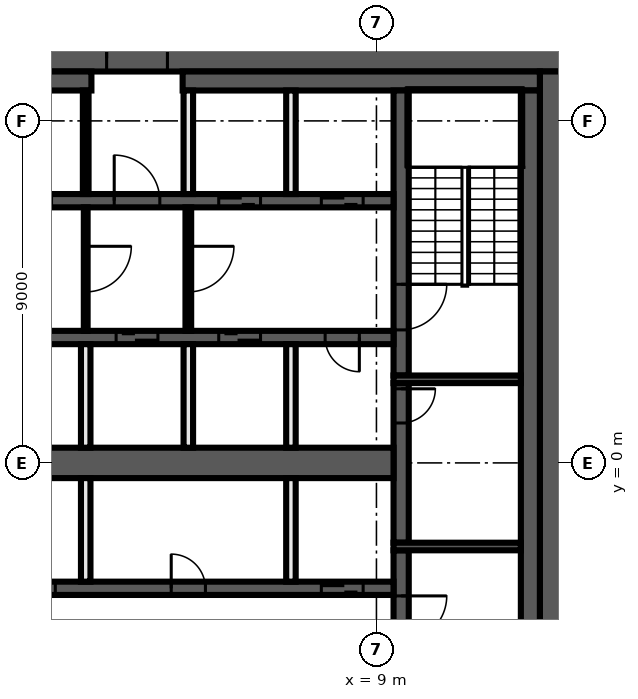
"""IFC4 building model, lengths in metres.
Left out: names, types, materials, properties, quantities, classifications, styles, units other than length and angle.
Written with IfcOpenShell. Run it as: python <this file> out.ifc"""

import sys

from ifc_helpers import new_model, si_unit, direction, frame, frame_2d, origin, place, context, subcontext, project, spatial, rectangle, extrude, element, fill, save


model = new_model("IFC4")
c1 = context("Model", 3, precision=1e-05, world=origin(), true_north=direction((0.0, 1.0)))
c2 = subcontext(c1, "Body", "Model", "MODEL_VIEW")
j1 = project(units=[si_unit("LENGTHUNIT", "METRE"), si_unit("PLANEANGLEUNIT", "RADIAN")], contexts=[c1])
p1 = place(None, origin())
s1 = spatial("IfcSite", under=j1, at=p1, CompositionType="ELEMENT")
p2 = place(p1, origin())
s2 = spatial("IfcBuilding", under=s1, at=p2, CompositionType="ELEMENT")
p3 = place(p2, frame((0.0, 0.0, 241.2)))
s3 = spatial("IfcBuildingStorey", under=s2, at=p3, CompositionType="ELEMENT", Elevation=241.2)
p4 = place(p3, frame((-14.0, 10.65, 0.0), z_axis=(0.0, 0.0, 1.0), x_axis=(1.0, 0.0, 0.0)))
e1 = element("IfcWall", 1, at=p4, inside=s3, PredefinedType="SHEAR", context=c2, shape_type="SweptSolid", body=[
    extrude(rectangle(XDim=28.0, YDim=0.7, at=frame_2d((14.0, 0.0))), origin(), (0.0, 0.0, 1.0), 3.82),
])
p5 = place(p4, frame((15.9, 0.0, 0.0)))
e2 = element("IfcOpeningElement", 2, at=p5, cuts=e1, PredefinedType="OPENING", context=c2, shape_type="SweptSolid", body=[
    extrude(rectangle(XDim=1.6, YDim=2.1, at=frame_2d((0.8, 1.05))), frame((0.0, 0.36, 0.0), z_axis=(0.0, -1.0, 0.0), x_axis=(1.0, 0.0, 0.0)), (0.0, 0.0, 1.0), 0.72),
])
p6 = place(p3, frame((13.65, 10.3, 0.0), z_axis=(0.0, 0.0, 1.0), x_axis=(0.0, -1.0, 0.0)))
e3 = element("IfcWall", 3, at=p6, inside=s3, PredefinedType="SHEAR", context=c2, shape_type="SweptSolid", body=[
    extrude(rectangle(XDim=20.6, YDim=0.7, at=frame_2d((10.3, 0.0))), origin(), (0.0, 0.0, 1.0), 3.82),
])
p7 = place(p3, frame((-13.3, 10.05, 0.0), z_axis=(0.0, 0.0, 1.0), x_axis=(1.0, 0.0, 0.0)))
e4 = element("IfcWall", 4, at=p7, inside=s3, PredefinedType="SHEAR", context=c2, shape_type="SweptSolid", body=[
    extrude(rectangle(XDim=14.8, YDim=0.5, at=frame_2d((7.4, 0.0))), origin(), (0.0, 0.0, 1.0), 3.82),
])
p8 = place(p3, frame((3.9, 10.05, 0.0), z_axis=(0.0, 0.0, 1.0), x_axis=(1.0, 0.0, 0.0)))
e5 = element("IfcWall", 5, at=p8, inside=s3, PredefinedType="SHEAR", context=c2, shape_type="SweptSolid", body=[
    extrude(rectangle(XDim=9.4, YDim=0.5, at=frame_2d((4.7, 0.0))), origin(), (0.0, 0.0, 1.0), 3.82),
])
p9 = place(p3, frame((13.05, 9.8, 0.0), z_axis=(0.0, 0.0, 1.0), x_axis=(0.0, -1.0, 0.0)))
e6 = element("IfcWall", 6, at=p9, inside=s3, PredefinedType="SHEAR", context=c2, shape_type="SweptSolid", body=[
    extrude(rectangle(XDim=19.6, YDim=0.5, at=frame_2d((9.8, 0.0))), origin(), (0.0, 0.0, 1.0), 3.82),
])
p10 = place(p3, frame((9.65, -2.3, 0.0), z_axis=(0.0, 0.0, 1.0), x_axis=(0.0, -1.0, 0.0)))
e7 = element("IfcWall", 7, at=p10, inside=s3, PredefinedType="SHEAR", context=c2, shape_type="SweptSolid", body=[
    extrude(rectangle(XDim=7.5, YDim=0.4, at=frame_2d((3.75, 0.0))), origin(), (0.0, 0.0, 1.0), 3.82),
])
p11 = place(p10, frame((1.2, 0.0, 0.0)))
e8 = element("IfcOpeningElement", 8, at=p11, cuts=e7, PredefinedType="OPENING", context=c2, shape_type="SweptSolid", body=[
    extrude(rectangle(XDim=1.2, YDim=2.1, at=frame_2d((0.6, 1.05))), frame((0.0, 0.21, 0.0), z_axis=(0.0, -1.0, 0.0), x_axis=(1.0, 0.0, 0.0)), (0.0, 0.0, 1.0), 0.42),
])
p12 = place(p3, frame((9.65, 2.1, 0.0), z_axis=(0.0, 0.0, 1.0), x_axis=(0.0, -1.0, 0.0)))
e9 = element("IfcWall", 9, at=p12, inside=s3, PredefinedType="SHEAR", context=c2, shape_type="SweptSolid", body=[
    extrude(rectangle(XDim=4.2, YDim=0.4, at=frame_2d((2.1, 0.0))), origin(), (0.0, 0.0, 1.0), 3.82),
])
p13 = place(p12, frame((0.15, 0.0, 0.0)))
e10 = element("IfcOpeningElement", 10, at=p13, cuts=e9, PredefinedType="OPENING", context=c2, shape_type="SweptSolid", body=[
    extrude(rectangle(XDim=0.9, YDim=2.1, at=frame_2d((0.45, 1.05))), frame((0.0, 0.21, 0.0), z_axis=(0.0, -1.0, 0.0), x_axis=(1.0, 0.0, 0.0)), (0.0, 0.0, 1.0), 0.42),
])
p14 = place(p3, frame((9.65, 9.8, 0.0), z_axis=(0.0, 0.0, 1.0), x_axis=(0.0, -1.0, 0.0)))
e11 = element("IfcWall", 11, at=p14, inside=s3, PredefinedType="SHEAR", context=c2, shape_type="SweptSolid", body=[
    extrude(rectangle(XDim=7.5, YDim=0.4, at=frame_2d((3.75, 0.0))), origin(), (0.0, 0.0, 1.0), 3.82),
])
p15 = place(p14, frame((5.1, 0.0, 0.0)))
e12 = element("IfcOpeningElement", 12, at=p15, cuts=e11, PredefinedType="OPENING", context=c2, shape_type="SweptSolid", body=[
    extrude(rectangle(XDim=1.2, YDim=2.1, at=frame_2d((0.6, 1.05))), frame((0.0, 0.21, 0.0), z_axis=(0.0, -1.0, 0.0), x_axis=(1.0, 0.0, 0.0)), (0.0, 0.0, 1.0), 0.42),
])
for number, where, z_axis, x_axis in (
    (13, (9.45, 2.2, 0.0), (0.0, 0.0, 1.0), (1.0, 0.0, 0.0)),
    (14, (9.45, -2.2, 0.0), (0.0, 0.0, 1.0), (1.0, 0.0, 0.0)),
):
    element("IfcWall", number, at=place(p3, frame(where, z_axis=z_axis, x_axis=x_axis)), inside=s3, PredefinedType="SHEAR", context=c2, shape_type="SweptSolid", body=[
        extrude(rectangle(XDim=3.35, YDim=0.2, at=frame_2d((1.675, 0.0))), origin(), (0.0, 0.0, 1.0), 3.82),
    ])
p16 = place(p3, frame((-9.45, 6.9, 0.0), z_axis=(0.0, 0.0, 1.0), x_axis=(1.0, 0.0, 0.0)))
e15 = element("IfcWall", 15, at=p16, inside=s3, PredefinedType="SHEAR", context=c2, shape_type="SweptSolid", body=[
    extrude(rectangle(XDim=18.9, YDim=0.35, at=frame_2d((9.45, 0.0))), origin(), (0.0, 0.0, 1.0), 3.82),
])
p17 = place(p16, frame((11.55, 0.0, 0.0)))
e16 = element("IfcOpeningElement", 16, at=p17, cuts=e15, PredefinedType="OPENING", context=c2, shape_type="SweptSolid", body=[
    extrude(rectangle(XDim=1.2, YDim=2.1, at=frame_2d((0.6, 1.05))), frame((0.0, 0.185, 0.0), z_axis=(0.0, -1.0, 0.0), x_axis=(1.0, 0.0, 0.0)), (0.0, 0.0, 1.0), 0.37),
])
p18 = place(p16, frame((14.3, 0.0, 0.0)))
e17 = element("IfcOpeningElement", 17, at=p18, cuts=e15, PredefinedType="OPENING", context=c2, shape_type="SweptSolid", body=[
    extrude(rectangle(XDim=1.1, YDim=2.1, at=frame_2d((0.55, 1.05))), frame((0.0, 0.185, 0.0), z_axis=(0.0, -1.0, 0.0), x_axis=(1.0, 0.0, 0.0)), (0.0, 0.0, 1.0), 0.37),
])
p19 = place(p16, frame((17.0, 0.0, 0.0)))
e18 = element("IfcOpeningElement", 18, at=p19, cuts=e15, PredefinedType="OPENING", context=c2, shape_type="SweptSolid", body=[
    extrude(rectangle(XDim=1.1, YDim=2.1, at=frame_2d((0.55, 1.05))), frame((0.0, 0.185, 0.0), z_axis=(0.0, -1.0, 0.0), x_axis=(1.0, 0.0, 0.0)), (0.0, 0.0, 1.0), 0.37),
])
p20 = place(p16, frame((0.9, 0.0, 0.0)))
e19 = element("IfcOpeningElement", 19, at=p20, cuts=e15, PredefinedType="OPENING", context=c2, shape_type="SweptSolid", body=[
    extrude(rectangle(XDim=0.9, YDim=2.1, at=frame_2d((0.45, 1.05))), frame((0.0, 0.185, 0.0), z_axis=(0.0, -1.0, 0.0), x_axis=(1.0, 0.0, 0.0)), (0.0, 0.0, 1.0), 0.37),
])
p21 = place(p16, frame((3.6, 0.0, 0.0)))
e20 = element("IfcOpeningElement", 20, at=p21, cuts=e15, PredefinedType="OPENING", context=c2, shape_type="SweptSolid", body=[
    extrude(rectangle(XDim=0.9, YDim=2.1, at=frame_2d((0.45, 1.05))), frame((0.0, 0.185, 0.0), z_axis=(0.0, -1.0, 0.0), x_axis=(1.0, 0.0, 0.0)), (0.0, 0.0, 1.0), 0.37),
])
p22 = place(p16, frame((6.3, 0.0, 0.0)))
e21 = element("IfcOpeningElement", 21, at=p22, cuts=e15, PredefinedType="OPENING", context=c2, shape_type="SweptSolid", body=[
    extrude(rectangle(XDim=0.9, YDim=2.1, at=frame_2d((0.45, 1.05))), frame((0.0, 0.185, 0.0), z_axis=(0.0, -1.0, 0.0), x_axis=(1.0, 0.0, 0.0)), (0.0, 0.0, 1.0), 0.37),
])
p23 = place(p16, frame((9.0, 0.0, 0.0)))
e22 = element("IfcOpeningElement", 22, at=p23, cuts=e15, PredefinedType="OPENING", context=c2, shape_type="SweptSolid", body=[
    extrude(rectangle(XDim=0.9, YDim=2.1, at=frame_2d((0.45, 1.05))), frame((0.0, 0.185, 0.0), z_axis=(0.0, -1.0, 0.0), x_axis=(1.0, 0.0, 0.0)), (0.0, 0.0, 1.0), 0.37),
])
p24 = place(p3, frame((9.45, 3.3, 0.0), z_axis=(0.0, 0.0, 1.0), x_axis=(-1.0, 0.0, 0.0)))
e23 = element("IfcWall", 23, at=p24, inside=s3, PredefinedType="SHEAR", context=c2, shape_type="SweptSolid", body=[
    extrude(rectangle(XDim=18.9, YDim=0.35, at=frame_2d((9.45, 0.0))), origin(), (0.0, 0.0, 1.0), 3.82),
])
p25 = place(p24, frame((6.2, 0.0, 0.0)))
e24 = element("IfcOpeningElement", 24, at=p25, cuts=e23, PredefinedType="OPENING", context=c2, shape_type="SweptSolid", body=[
    extrude(rectangle(XDim=1.1, YDim=2.1, at=frame_2d((0.55, 1.05))), frame((0.0, 0.185, 0.0), z_axis=(0.0, -1.0, 0.0), x_axis=(1.0, 0.0, 0.0)), (0.0, 0.0, 1.0), 0.37),
])
p26 = place(p24, frame((3.5, 0.0, 0.0)))
e25 = element("IfcOpeningElement", 25, at=p26, cuts=e23, PredefinedType="OPENING", context=c2, shape_type="SweptSolid", body=[
    extrude(rectangle(XDim=1.1, YDim=2.1, at=frame_2d((0.55, 1.05))), frame((0.0, 0.185, 0.0), z_axis=(0.0, -1.0, 0.0), x_axis=(1.0, 0.0, 0.0)), (0.0, 0.0, 1.0), 0.37),
])
p27 = place(p24, frame((0.9, 0.0, 0.0)))
e26 = element("IfcOpeningElement", 26, at=p27, cuts=e23, PredefinedType="OPENING", context=c2, shape_type="SweptSolid", body=[
    extrude(rectangle(XDim=0.9, YDim=2.1, at=frame_2d((0.45, 1.05))), frame((0.0, 0.185, 0.0), z_axis=(0.0, -1.0, 0.0), x_axis=(1.0, 0.0, 0.0)), (0.0, 0.0, 1.0), 0.37),
])
p28 = place(p24, frame((15.75, 0.0, 0.0)))
e27 = element("IfcOpeningElement", 27, at=p28, cuts=e23, PredefinedType="OPENING", context=c2, shape_type="SweptSolid", body=[
    extrude(rectangle(XDim=0.9, YDim=2.1, at=frame_2d((0.45, 1.05))), frame((0.0, 0.185, 0.0), z_axis=(0.0, -1.0, 0.0), x_axis=(1.0, 0.0, 0.0)), (0.0, 0.0, 1.0), 0.37),
])
p29 = place(p24, frame((10.35, 0.0, 0.0)))
e28 = element("IfcOpeningElement", 28, at=p29, cuts=e23, PredefinedType="OPENING", context=c2, shape_type="SweptSolid", body=[
    extrude(rectangle(XDim=0.9, YDim=2.1, at=frame_2d((0.45, 1.05))), frame((0.0, 0.185, 0.0), z_axis=(0.0, -1.0, 0.0), x_axis=(1.0, 0.0, 0.0)), (0.0, 0.0, 1.0), 0.37),
])
p30 = place(p3, frame((-9.45, -3.3, 0.0), z_axis=(0.0, 0.0, 1.0), x_axis=(1.0, 0.0, 0.0)))
e29 = element("IfcWall", 29, at=p30, inside=s3, PredefinedType="SHEAR", context=c2, shape_type="SweptSolid", body=[
    extrude(rectangle(XDim=18.9, YDim=0.35, at=frame_2d((9.45, 0.0))), origin(), (0.0, 0.0, 1.0), 3.82),
])
p31 = place(p30, frame((0.8, 0.0, 0.0)))
e30 = element("IfcOpeningElement", 30, at=p31, cuts=e29, PredefinedType="OPENING", context=c2, shape_type="SweptSolid", body=[
    extrude(rectangle(XDim=1.1, YDim=2.1, at=frame_2d((0.55, 1.05))), frame((0.0, 0.185, 0.0), z_axis=(0.0, -1.0, 0.0), x_axis=(1.0, 0.0, 0.0)), (0.0, 0.0, 1.0), 0.37),
])
p32 = place(p30, frame((3.5, 0.0, 0.0)))
e31 = element("IfcOpeningElement", 31, at=p32, cuts=e29, PredefinedType="OPENING", context=c2, shape_type="SweptSolid", body=[
    extrude(rectangle(XDim=1.1, YDim=2.1, at=frame_2d((0.55, 1.05))), frame((0.0, 0.185, 0.0), z_axis=(0.0, -1.0, 0.0), x_axis=(1.0, 0.0, 0.0)), (0.0, 0.0, 1.0), 0.37),
])
p33 = place(p30, frame((6.2, 0.0, 0.0)))
e32 = element("IfcOpeningElement", 32, at=p33, cuts=e29, PredefinedType="OPENING", context=c2, shape_type="SweptSolid", body=[
    extrude(rectangle(XDim=1.1, YDim=2.1, at=frame_2d((0.55, 1.05))), frame((0.0, 0.185, 0.0), z_axis=(0.0, -1.0, 0.0), x_axis=(1.0, 0.0, 0.0)), (0.0, 0.0, 1.0), 0.37),
])
p34 = place(p30, frame((8.9, 0.0, 0.0)))
e33 = element("IfcOpeningElement", 33, at=p34, cuts=e29, PredefinedType="OPENING", context=c2, shape_type="SweptSolid", body=[
    extrude(rectangle(XDim=1.1, YDim=2.1, at=frame_2d((0.55, 1.05))), frame((0.0, 0.185, 0.0), z_axis=(0.0, -1.0, 0.0), x_axis=(1.0, 0.0, 0.0)), (0.0, 0.0, 1.0), 0.37),
])
p35 = place(p30, frame((17.0, 0.0, 0.0)))
e34 = element("IfcOpeningElement", 34, at=p35, cuts=e29, PredefinedType="OPENING", context=c2, shape_type="SweptSolid", body=[
    extrude(rectangle(XDim=1.1, YDim=2.1, at=frame_2d((0.55, 1.05))), frame((0.0, 0.185, 0.0), z_axis=(0.0, -1.0, 0.0), x_axis=(1.0, 0.0, 0.0)), (0.0, 0.0, 1.0), 0.37),
])
p36 = place(p30, frame((13.05, 0.0, 0.0)))
e35 = element("IfcOpeningElement", 35, at=p36, cuts=e29, PredefinedType="OPENING", context=c2, shape_type="SweptSolid", body=[
    extrude(rectangle(XDim=0.9, YDim=2.1, at=frame_2d((0.45, 1.05))), frame((0.0, 0.185, 0.0), z_axis=(0.0, -1.0, 0.0), x_axis=(1.0, 0.0, 0.0)), (0.0, 0.0, 1.0), 0.37),
])
p37 = place(p3, frame((-9.45, 0.0, 0.0), z_axis=(0.0, 0.0, 1.0), x_axis=(1.0, 0.0, 0.0)))
e36 = element("IfcWall", 36, at=p37, inside=s3, PredefinedType="SHEAR", context=c2, shape_type="SweptSolid", body=[
    extrude(rectangle(XDim=18.9, YDim=0.8, at=frame_2d((9.45, 0.0))), origin(), (0.0, 0.0, 1.0), 3.82),
])
for number, where, z_axis, x_axis in (
    (37, (6.75, -3.125, 0.0), (0.0, 0.0, 1.0), (0.0, 1.0, 0.0)),
    (38, (6.75, 0.4, 0.0), (0.0, 0.0, 1.0), (0.0, 1.0, 0.0)),
    (39, (6.75, 7.075, 0.0), (0.0, 0.0, 1.0), (0.0, 1.0, 0.0)),
):
    element("IfcWall", number, at=place(p3, frame(where, z_axis=z_axis, x_axis=x_axis)), inside=s3, PredefinedType="SOLIDWALL", context=c2, shape_type="SweptSolid", body=[
        extrude(rectangle(XDim=2.725, YDim=0.25, at=frame_2d((1.363, 0.0))), origin(), (0.0, 0.0, 1.0), 3.82),
    ])
p38 = place(p3, frame((4.05, 6.725, 0.0), z_axis=(0.0, 0.0, 1.0), x_axis=(0.0, -1.0, 0.0)))
e40 = element("IfcWall", 40, at=p38, inside=s3, PredefinedType="PARTITIONING", context=c2, shape_type="SweptSolid", body=[
    extrude(rectangle(XDim=3.25, YDim=0.15, at=frame_2d((1.625, 0.0))), origin(), (0.0, 0.0, 1.0), 3.82),
])
p39 = place(p38, frame((1.025, 0.0, 0.0)))
e41 = element("IfcOpeningElement", 41, at=p39, cuts=e40, PredefinedType="OPENING", context=c2, shape_type="SweptSolid", body=[
    extrude(rectangle(XDim=1.2, YDim=2.1, at=frame_2d((0.6, 1.05))), frame((0.0, 0.085, 0.0), z_axis=(0.0, -1.0, 0.0), x_axis=(1.0, 0.0, 0.0)), (0.0, 0.0, 1.0), 0.17),
])
for number, where, z_axis, x_axis in (
    (42, (4.05, 0.4, 0.0), (0.0, 0.0, 1.0), (0.0, 1.0, 0.0)),
    (43, (4.05, 7.075, 0.0), (0.0, 0.0, 1.0), (0.0, 1.0, 0.0)),
):
    element("IfcWall", number, at=place(p3, frame(where, z_axis=z_axis, x_axis=x_axis)), inside=s3, PredefinedType="SOLIDWALL", context=c2, shape_type="SweptSolid", body=[
        extrude(rectangle(XDim=2.725, YDim=0.25, at=frame_2d((1.363, 0.0))), origin(), (0.0, 0.0, 1.0), 3.82),
    ])
p40 = place(p3, frame((1.35, 7.075, 0.0), z_axis=(0.0, 0.0, 1.0), x_axis=(0.0, 1.0, 0.0)))
e44 = element("IfcWall", 44, at=p40, inside=s3, PredefinedType="PARTITIONING", context=c2, shape_type="SweptSolid", body=[
    extrude(rectangle(XDim=2.725, YDim=0.15, at=frame_2d((1.363, 0.0))), origin(), (0.0, 0.0, 1.0), 3.82),
])
p41 = place(p3, frame((1.35, 6.725, 0.0), z_axis=(0.0, 0.0, 1.0), x_axis=(0.0, -1.0, 0.0)))
e45 = element("IfcWall", 45, at=p41, inside=s3, PredefinedType="PARTITIONING", context=c2, shape_type="SweptSolid", body=[
    extrude(rectangle(XDim=3.25, YDim=0.1, at=frame_2d((1.625, 0.0))), origin(), (0.0, 0.0, 1.0), 3.82),
])
p42 = place(p41, frame((1.025, 0.0, 0.0)))
e46 = element("IfcOpeningElement", 46, at=p42, cuts=e45, PredefinedType="OPENING", context=c2, shape_type="SweptSolid", body=[
    extrude(rectangle(XDim=1.2, YDim=2.1, at=frame_2d((0.6, 1.05))), frame((0.0, 0.06, 0.0), z_axis=(0.0, -1.0, 0.0), x_axis=(1.0, 0.0, 0.0)), (0.0, 0.0, 1.0), 0.12),
])
for number, where, z_axis, x_axis in (
    (47, (1.35, -3.125, 0.0), (0.0, 0.0, 1.0), (0.0, 1.0, 0.0)),
    (48, (1.35, 0.4, 0.0), (0.0, 0.0, 1.0), (0.0, 1.0, 0.0)),
):
    element("IfcWall", number, at=place(p3, frame(where, z_axis=z_axis, x_axis=x_axis)), inside=s3, PredefinedType="SOLIDWALL", context=c2, shape_type="SweptSolid", body=[
        extrude(rectangle(XDim=2.725, YDim=0.25, at=frame_2d((1.363, 0.0))), origin(), (0.0, 0.0, 1.0), 3.82),
    ])
p43 = place(p13, origin())
e49 = element("IfcDoor", 49, at=p43, inside=s3, OperationType="SINGLE_SWING_RIGHT", PredefinedType="DOOR", context=c2, shape_type="SweptSolid", body=[
    extrude(rectangle(XDim=0.9, YDim=2.1, at=frame_2d((0.45, 1.05))), frame((0.0, 0.025, 0.0), z_axis=(0.0, -1.0, 0.0), x_axis=(1.0, 0.0, 0.0)), (0.0, 0.0, 1.0), 0.05),
])
fill(e10, e49)
p44 = place(p5, origin())
e50 = element("IfcDoor", 50, at=p44, inside=s3, OperationType="DOUBLE_DOOR_SINGLE_SWING", PredefinedType="DOOR", context=c2, shape_type="SweptSolid", body=[
    extrude(rectangle(XDim=1.6, YDim=2.1, at=frame_2d((0.8, 1.05))), frame((0.0, 0.025, 0.0), z_axis=(0.0, -1.0, 0.0), x_axis=(1.0, 0.0, 0.0)), (0.0, 0.0, 1.0), 0.05),
])
fill(e2, e50)
p45 = place(p17, origin())
e51 = element("IfcDoor", 51, at=p45, inside=s3, OperationType="SINGLE_SWING_LEFT", PredefinedType="DOOR", context=c2, shape_type="SweptSolid", body=[
    extrude(rectangle(XDim=1.2, YDim=2.1, at=frame_2d((0.6, 1.05))), frame((0.0, 0.025, 0.0), z_axis=(0.0, -1.0, 0.0), x_axis=(1.0, 0.0, 0.0)), (0.0, 0.0, 1.0), 0.05),
])
fill(e16, e51)
p46 = place(p18, origin())
e52 = element("IfcDoor", 52, at=p46, inside=s3, OperationType="DOUBLE_DOOR_SLIDING", PredefinedType="DOOR", context=c2, shape_type="SweptSolid", body=[
    extrude(rectangle(XDim=1.1, YDim=2.1, at=frame_2d((0.55, 1.05))), frame((0.0, 0.025, 0.0), z_axis=(0.0, -1.0, 0.0), x_axis=(1.0, 0.0, 0.0)), (0.0, 0.0, 1.0), 0.05),
])
fill(e17, e52)
p47 = place(p19, origin())
e53 = element("IfcDoor", 53, at=p47, inside=s3, OperationType="DOUBLE_DOOR_SLIDING", PredefinedType="DOOR", context=c2, shape_type="SweptSolid", body=[
    extrude(rectangle(XDim=1.1, YDim=2.1, at=frame_2d((0.55, 1.05))), frame((0.0, 0.025, 0.0), z_axis=(0.0, -1.0, 0.0), x_axis=(1.0, 0.0, 0.0)), (0.0, 0.0, 1.0), 0.05),
])
fill(e18, e53)
p48 = place(p25, origin())
e54 = element("IfcDoor", 54, at=p48, inside=s3, OperationType="DOUBLE_DOOR_SLIDING", PredefinedType="DOOR", context=c2, shape_type="SweptSolid", body=[
    extrude(rectangle(XDim=1.1, YDim=2.1, at=frame_2d((0.55, 1.05))), frame((0.0, 0.025, 0.0), z_axis=(0.0, -1.0, 0.0), x_axis=(1.0, 0.0, 0.0)), (0.0, 0.0, 1.0), 0.05),
])
fill(e24, e54)
p49 = place(p26, origin())
e55 = element("IfcDoor", 55, at=p49, inside=s3, OperationType="DOUBLE_DOOR_SLIDING", PredefinedType="DOOR", context=c2, shape_type="SweptSolid", body=[
    extrude(rectangle(XDim=1.1, YDim=2.1, at=frame_2d((0.55, 1.05))), frame((0.0, 0.025, 0.0), z_axis=(0.0, -1.0, 0.0), x_axis=(1.0, 0.0, 0.0)), (0.0, 0.0, 1.0), 0.05),
])
fill(e25, e55)
p50 = place(p27, origin())
e56 = element("IfcDoor", 56, at=p50, inside=s3, OperationType="SINGLE_SWING_LEFT", PredefinedType="DOOR", context=c2, shape_type="SweptSolid", body=[
    extrude(rectangle(XDim=0.9, YDim=2.1, at=frame_2d((0.45, 1.05))), frame((0.0, 0.025, 0.0), z_axis=(0.0, -1.0, 0.0), x_axis=(1.0, 0.0, 0.0)), (0.0, 0.0, 1.0), 0.05),
])
fill(e26, e56)
p51 = place(p34, origin())
e57 = element("IfcDoor", 57, at=p51, inside=s3, OperationType="DOUBLE_DOOR_SLIDING", PredefinedType="DOOR", context=c2, shape_type="SweptSolid", body=[
    extrude(rectangle(XDim=1.1, YDim=2.1, at=frame_2d((0.55, 1.05))), frame((0.0, 0.025, 0.0), z_axis=(0.0, -1.0, 0.0), x_axis=(1.0, 0.0, 0.0)), (0.0, 0.0, 1.0), 0.05),
])
fill(e33, e57)
p52 = place(p35, origin())
e58 = element("IfcDoor", 58, at=p52, inside=s3, OperationType="DOUBLE_DOOR_SLIDING", PredefinedType="DOOR", context=c2, shape_type="SweptSolid", body=[
    extrude(rectangle(XDim=1.1, YDim=2.1, at=frame_2d((0.55, 1.05))), frame((0.0, 0.025, 0.0), z_axis=(0.0, -1.0, 0.0), x_axis=(1.0, 0.0, 0.0)), (0.0, 0.0, 1.0), 0.05),
])
fill(e34, e58)
p53 = place(p36, origin())
e59 = element("IfcDoor", 59, at=p53, inside=s3, OperationType="SINGLE_SWING_RIGHT", PredefinedType="DOOR", context=c2, shape_type="SweptSolid", body=[
    extrude(rectangle(XDim=0.9, YDim=2.1, at=frame_2d((0.45, 1.05))), frame((0.0, 0.025, 0.0), z_axis=(0.0, -1.0, 0.0), x_axis=(1.0, 0.0, 0.0)), (0.0, 0.0, 1.0), 0.05),
])
fill(e35, e59)
p54 = place(p15, origin())
e60 = element("IfcDoor", 60, at=p54, inside=s3, OperationType="SINGLE_SWING_LEFT", PredefinedType="DOOR", context=c2, shape_type="SweptSolid", body=[
    extrude(rectangle(XDim=1.2, YDim=2.1, at=frame_2d((0.6, 1.05))), frame((0.0, 0.025, 0.0), z_axis=(0.0, -1.0, 0.0), x_axis=(1.0, 0.0, 0.0)), (0.0, 0.0, 1.0), 0.05),
])
fill(e12, e60)
p55 = place(p11, origin())
e61 = element("IfcDoor", 61, at=p55, inside=s3, OperationType="SINGLE_SWING_RIGHT", PredefinedType="DOOR", context=c2, shape_type="SweptSolid", body=[
    extrude(rectangle(XDim=1.2, YDim=2.1, at=frame_2d((0.6, 1.05))), frame((0.0, 0.025, 0.0), z_axis=(0.0, -1.0, 0.0), x_axis=(1.0, 0.0, 0.0)), (0.0, 0.0, 1.0), 0.05),
])
fill(e8, e61)
p56 = place(p42, origin())
e62 = element("IfcDoor", 62, at=p56, inside=s3, OperationType="SINGLE_SWING_LEFT", PredefinedType="DOOR", context=c2, shape_type="SweptSolid", body=[
    extrude(rectangle(XDim=1.2, YDim=2.1, at=frame_2d((0.6, 1.05))), frame((0.0, 0.025, 0.0), z_axis=(0.0, -1.0, 0.0), x_axis=(1.0, 0.0, 0.0)), (0.0, 0.0, 1.0), 0.05),
])
fill(e46, e62)
p57 = place(p39, origin())
e63 = element("IfcDoor", 63, at=p57, inside=s3, OperationType="SINGLE_SWING_RIGHT", PredefinedType="DOOR", context=c2, shape_type="SweptSolid", body=[
    extrude(rectangle(XDim=1.2, YDim=2.1, at=frame_2d((0.6, 1.05))), frame((0.0, 0.025, 0.0), z_axis=(0.0, -1.0, 0.0), x_axis=(1.0, 0.0, 0.0)), (0.0, 0.0, 1.0), 0.05),
])
fill(e41, e63)
save(model, sys.argv[1])
